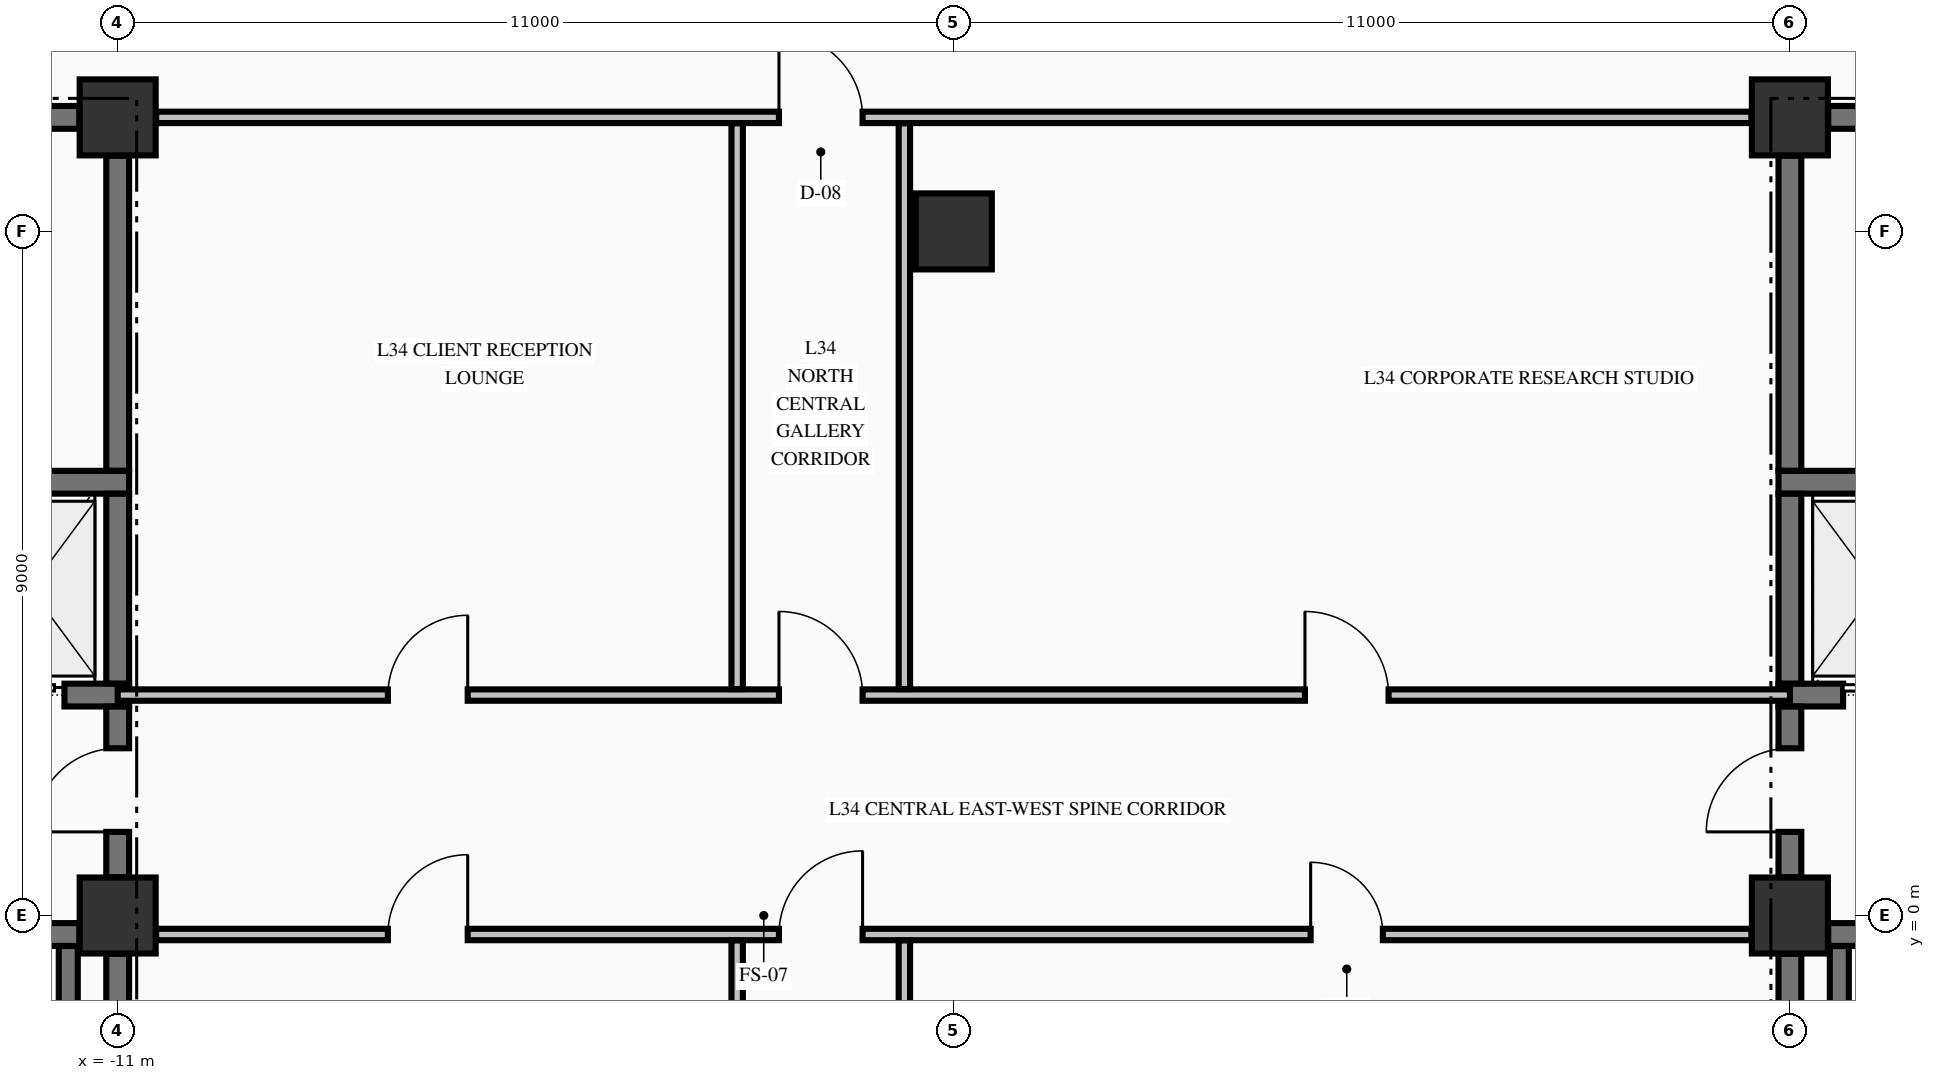
"""IFC4 building model, lengths in metres.
Left out: names, types, materials, properties, quantities, classifications, styles, units other than length and angle.
Written with IfcOpenShell. Run it as: python <this file> out.ifc"""

import sys

from ifc_helpers import new_model, si_unit, direction, frame, frame_2d, origin, origin_2d, place, context, subcontext, project, spatial, rectangle, extrude, element, fill, save


model = new_model("IFC4")
c1 = context("Model", 3, precision=1e-05, world=origin(), true_north=direction((0.0, 1.0)))
c2 = subcontext(c1, "Body", "Model", "MODEL_VIEW")
j1 = project(units=[si_unit("LENGTHUNIT", "METRE"), si_unit("PLANEANGLEUNIT", "RADIAN")], contexts=[c1])
p1 = place(None, origin())
s1 = spatial("IfcSite", under=j1, at=p1, CompositionType="ELEMENT")
p2 = place(p1, origin())
s2 = spatial("IfcBuilding", under=s1, at=p2, CompositionType="ELEMENT")
p3 = place(p2, frame((0.0, 0.0, 135.63)))
s3 = spatial("IfcBuildingStorey", under=s2, at=p3, CompositionType="ELEMENT", Elevation=135.63)
for number, where, z_axis, x_axis in (
    (1, (-11.0, 0.0, -0.25), (0.0, 0.0, 1.0), (1.0, 0.0, 0.0)),
    (2, (-11.0, 10.5, -0.25), (0.0, 0.0, 1.0), (1.0, 0.0, 0.0)),
    (3, (11.0, 0.0, -0.25), (0.0, 0.0, 1.0), (1.0, 0.0, 0.0)),
    (4, (11.0, 10.5, -0.25), (0.0, 0.0, 1.0), (1.0, 0.0, 0.0)),
    (5, (0.0, 9.0, -0.25), (0.0, 0.0, 1.0), (1.0, 0.0, 0.0)),
):
    element("IfcColumn", number, at=place(p3, frame(where, z_axis=z_axis, x_axis=x_axis)), inside=s3, PredefinedType="COLUMN", context=c2, shape_type="SweptSolid", body=[
        extrude(rectangle(XDim=1.0, YDim=1.0, at=origin_2d()), origin(), (0.0, 0.0, 1.0), 3.57),
    ])
p4 = place(p3, frame((-19.496, -0.25, 0.0), z_axis=(0.0, 0.0, 1.0), x_axis=(1.0, 0.0, 0.0)))
e6 = element("IfcWall", 6, at=p4, inside=s3, PredefinedType="SHEAR", context=c2, shape_type="SweptSolid", body=[
    extrude(rectangle(XDim=7.992, YDim=0.3, at=frame_2d((3.996, 0.0))), origin(), (0.0, 0.0, 1.0), 3.32),
])
p5 = place(p4, frame((5.796, 0.0, 0.0)))
e7 = element("IfcOpeningElement", 7, at=p5, cuts=e6, PredefinedType="OPENING", context=c2, shape_type="SweptSolid", body=[
    extrude(rectangle(XDim=1.1, YDim=2.15, at=frame_2d((0.55, 1.075))), frame((0.0, 0.16, 0.0), z_axis=(0.0, -1.0, 0.0), x_axis=(1.0, 0.0, 0.0)), (0.0, 0.0, 1.0), 0.32),
])
p6 = place(p3, frame((11.504, -0.25, 0.0), z_axis=(0.0, 0.0, 1.0), x_axis=(1.0, 0.0, 0.0)))
e8 = element("IfcWall", 8, at=p6, inside=s3, PredefinedType="SHEAR", context=c2, shape_type="SweptSolid", body=[
    extrude(rectangle(XDim=3.371, YDim=0.3, at=frame_2d((1.686, 0.0))), origin(), (0.0, 0.0, 1.0), 3.32),
])
p7 = place(p6, frame((1.096, 0.0, 0.0)))
e9 = element("IfcOpeningElement", 9, at=p7, cuts=e8, PredefinedType="OPENING", context=c2, shape_type="SweptSolid", body=[
    extrude(rectangle(XDim=1.1, YDim=2.15, at=frame_2d((0.55, 1.075))), frame((0.0, 0.16, 0.0), z_axis=(0.0, -1.0, 0.0), x_axis=(1.0, 0.0, 0.0)), (0.0, 0.0, 1.0), 0.32),
])
p8 = place(p3, frame((-14.875, 2.9, 0.0), z_axis=(0.0, 0.0, 1.0), x_axis=(1.0, 0.0, 0.0)))
e10 = element("IfcWall", 10, at=p8, inside=s3, PredefinedType="SHEAR", context=c2, shape_type="SweptSolid", body=[
    extrude(rectangle(XDim=4.025, YDim=0.3, at=frame_2d((2.012, 0.0))), origin(), (0.0, 0.0, 1.0), 3.32),
])
p9 = place(p8, frame((2.075, 0.0, 0.0)))
e11 = element("IfcOpeningElement", 11, at=p9, cuts=e10, PredefinedType="OPENING", context=c2, shape_type="SweptSolid", body=[
    extrude(rectangle(XDim=1.1, YDim=2.2, at=frame_2d((0.55, 1.1))), frame((0.0, 0.16, 0.0), z_axis=(0.0, -1.0, 0.0), x_axis=(1.0, 0.0, 0.0)), (0.0, 0.0, 1.0), 0.32),
])
p10 = place(p3, frame((10.85, 2.9, 0.0), z_axis=(0.0, 0.0, 1.0), x_axis=(1.0, 0.0, 0.0)))
e12 = element("IfcWall", 12, at=p10, inside=s3, PredefinedType="SHEAR", context=c2, shape_type="SweptSolid", body=[
    extrude(rectangle(XDim=4.025, YDim=0.3, at=frame_2d((2.012, 0.0))), origin(), (0.0, 0.0, 1.0), 3.32),
])
p11 = place(p10, frame((0.85, 0.0, 0.0)))
e13 = element("IfcOpeningElement", 13, at=p11, cuts=e12, PredefinedType="OPENING", context=c2, shape_type="SweptSolid", body=[
    extrude(rectangle(XDim=1.1, YDim=2.2, at=frame_2d((0.55, 1.1))), frame((0.0, 0.16, 0.0), z_axis=(0.0, -1.0, 0.0), x_axis=(1.0, 0.0, 0.0)), (0.0, 0.0, 1.0), 0.32),
])
for number, where, z_axis, x_axis in (
    (14, (-14.875, 5.7, 0.0), (0.0, 0.0, 1.0), (1.0, 0.0, 0.0)),
    (15, (10.85, 5.7, 0.0), (0.0, 0.0, 1.0), (1.0, 0.0, 0.0)),
):
    element("IfcWall", number, at=place(p3, frame(where, z_axis=z_axis, x_axis=x_axis)), inside=s3, PredefinedType="SHEAR", context=c2, shape_type="SweptSolid", body=[
        extrude(rectangle(XDim=4.025, YDim=0.3, at=frame_2d((2.012, 0.0))), origin(), (0.0, 0.0, 1.0), 3.32),
    ])
p12 = place(p3, frame((-14.7, 10.5, 0.0), z_axis=(0.0, 0.0, 1.0), x_axis=(1.0, 0.0, 0.0)))
e16 = element("IfcWall", 16, at=p12, inside=s3, PredefinedType="SHEAR", context=c2, shape_type="SweptSolid", body=[
    extrude(rectangle(XDim=3.196, YDim=0.3, at=frame_2d((1.598, 0.0))), origin(), (0.0, 0.0, 1.0), 3.32),
])
p13 = place(p12, frame((0.775, 0.0, 0.0)))
e17 = element("IfcOpeningElement", 17, at=p13, cuts=e16, PredefinedType="OPENING", context=c2, shape_type="SweptSolid", body=[
    extrude(rectangle(XDim=0.95, YDim=2.15, at=frame_2d((0.475, 1.075))), frame((0.0, 0.16, 0.0), z_axis=(0.0, -1.0, 0.0), x_axis=(1.0, 0.0, 0.0)), (0.0, 0.0, 1.0), 0.32),
])
p14 = place(p3, frame((11.504, 10.5, 0.0), z_axis=(0.0, 0.0, 1.0), x_axis=(1.0, 0.0, 0.0)))
e18 = element("IfcWall", 18, at=p14, inside=s3, PredefinedType="SHEAR", context=c2, shape_type="SweptSolid", body=[
    extrude(rectangle(XDim=3.196, YDim=0.3, at=frame_2d((1.598, 0.0))), origin(), (0.0, 0.0, 1.0), 3.32),
])
p15 = place(p14, frame((1.471, 0.0, 0.0)))
e19 = element("IfcOpeningElement", 19, at=p15, cuts=e18, PredefinedType="OPENING", context=c2, shape_type="SweptSolid", body=[
    extrude(rectangle(XDim=0.95, YDim=2.15, at=frame_2d((0.475, 1.075))), frame((0.0, 0.16, 0.0), z_axis=(0.0, -1.0, 0.0), x_axis=(1.0, 0.0, 0.0)), (0.0, 0.0, 1.0), 0.32),
])
p16 = place(p3, frame((-10.494, -0.25, 0.0), z_axis=(0.0, 0.0, 1.0), x_axis=(1.0, 0.0, 0.0)))
e20 = element("IfcWall", 20, at=p16, inside=s3, PredefinedType="PARTITIONING", context=c2, shape_type="SweptSolid", body=[
    extrude(rectangle(XDim=20.988, YDim=0.15, at=frame_2d((10.494, 0.0))), origin(), (0.0, 0.0, 1.0), 3.32),
])
p17 = place(p16, frame((8.194, 0.0, 0.0)))
e21 = element("IfcOpeningElement", 21, at=p17, cuts=e20, PredefinedType="OPENING", context=c2, shape_type="SweptSolid", body=[
    extrude(rectangle(XDim=1.1, YDim=2.15, at=frame_2d((0.55, 1.075))), frame((0.0, 0.085, 0.0), z_axis=(0.0, -1.0, 0.0), x_axis=(1.0, 0.0, 0.0)), (0.0, 0.0, 1.0), 0.17),
])
p18 = place(p16, frame((3.049, 0.0, 0.0)))
e22 = element("IfcOpeningElement", 22, at=p18, cuts=e20, PredefinedType="OPENING", context=c2, shape_type="SweptSolid", body=[
    extrude(rectangle(XDim=1.05, YDim=2.15, at=frame_2d((0.525, 1.075))), frame((0.0, 0.085, 0.0), z_axis=(0.0, -1.0, 0.0), x_axis=(1.0, 0.0, 0.0)), (0.0, 0.0, 1.0), 0.17),
])
p19 = place(p16, frame((15.189, 0.0, 0.0)))
e23 = element("IfcOpeningElement", 23, at=p19, cuts=e20, PredefinedType="OPENING", context=c2, shape_type="SweptSolid", body=[
    extrude(rectangle(XDim=0.95, YDim=2.15, at=frame_2d((0.475, 1.075))), frame((0.0, 0.085, 0.0), z_axis=(0.0, -1.0, 0.0), x_axis=(1.0, 0.0, 0.0)), (0.0, 0.0, 1.0), 0.17),
])
p20 = place(p3, frame((-11.0, 2.9, 0.0), z_axis=(0.0, 0.0, 1.0), x_axis=(1.0, 0.0, 0.0)))
e24 = element("IfcWall", 24, at=p20, inside=s3, PredefinedType="PARTITIONING", context=c2, shape_type="SweptSolid", body=[
    extrude(rectangle(XDim=22.0, YDim=0.15, at=frame_2d((11.0, 0.0))), origin(), (0.0, 0.0, 1.0), 3.32),
])
p21 = place(p20, frame((8.7, 0.0, 0.0)))
e25 = element("IfcOpeningElement", 25, at=p21, cuts=e24, PredefinedType="OPENING", context=c2, shape_type="SweptSolid", body=[
    extrude(rectangle(XDim=1.1, YDim=2.15, at=frame_2d((0.55, 1.075))), frame((0.0, 0.085, 0.0), z_axis=(0.0, -1.0, 0.0), x_axis=(1.0, 0.0, 0.0)), (0.0, 0.0, 1.0), 0.17),
])
p22 = place(p20, frame((3.555, 0.0, 0.0)))
e26 = element("IfcOpeningElement", 26, at=p22, cuts=e24, PredefinedType="OPENING", context=c2, shape_type="SweptSolid", body=[
    extrude(rectangle(XDim=1.05, YDim=2.15, at=frame_2d((0.525, 1.075))), frame((0.0, 0.085, 0.0), z_axis=(0.0, -1.0, 0.0), x_axis=(1.0, 0.0, 0.0)), (0.0, 0.0, 1.0), 0.17),
])
p23 = place(p20, frame((15.62, 0.0, 0.0)))
e27 = element("IfcOpeningElement", 27, at=p23, cuts=e24, PredefinedType="OPENING", context=c2, shape_type="SweptSolid", body=[
    extrude(rectangle(XDim=1.1, YDim=2.15, at=frame_2d((0.55, 1.075))), frame((0.0, 0.085, 0.0), z_axis=(0.0, -1.0, 0.0), x_axis=(1.0, 0.0, 0.0)), (0.0, 0.0, 1.0), 0.17),
])
p24 = place(p3, frame((-10.494, 10.5, 0.0), z_axis=(0.0, 0.0, 1.0), x_axis=(1.0, 0.0, 0.0)))
e28 = element("IfcWall", 28, at=p24, inside=s3, PredefinedType="PARTITIONING", context=c2, shape_type="SweptSolid", body=[
    extrude(rectangle(XDim=20.988, YDim=0.15, at=frame_2d((10.494, 0.0))), origin(), (0.0, 0.0, 1.0), 3.32),
])
p25 = place(p24, frame((8.194, 0.0, 0.0)))
e29 = element("IfcOpeningElement", 29, at=p25, cuts=e28, PredefinedType="OPENING", context=c2, shape_type="SweptSolid", body=[
    extrude(rectangle(XDim=1.1, YDim=2.15, at=frame_2d((0.55, 1.075))), frame((0.0, 0.085, 0.0), z_axis=(0.0, -1.0, 0.0), x_axis=(1.0, 0.0, 0.0)), (0.0, 0.0, 1.0), 0.17),
])
p26 = place(p3, frame((-11.65, -9.798, 0.0), z_axis=(0.0, 0.0, 1.0), x_axis=(0.0, 1.0, 0.0)))
e30 = element("IfcWall", 30, at=p26, inside=s3, PredefinedType="SOLIDWALL", context=c2, shape_type="SweptSolid", body=[
    extrude(rectangle(XDim=9.396, YDim=0.25, at=frame_2d((4.698, 0.0))), origin(), (0.0, 0.0, 1.0), 3.32),
])
p27 = place(p3, frame((-11.0, -9.446, 0.0), z_axis=(0.0, 0.0, 1.0), x_axis=(0.0, 1.0, 0.0)))
e31 = element("IfcWall", 31, at=p27, inside=s3, PredefinedType="SHEAR", context=c2, shape_type="SweptSolid", body=[
    extrude(rectangle(XDim=8.942, YDim=0.3, at=frame_2d((4.471, 0.0))), origin(), (0.0, 0.0, 1.0), 3.32),
])
p28 = place(p3, frame((-11.0, 0.504, 0.0), z_axis=(0.0, 0.0, 1.0), x_axis=(0.0, 1.0, 0.0)))
e32 = element("IfcWall", 32, at=p28, inside=s3, PredefinedType="SHEAR", context=c2, shape_type="SweptSolid", body=[
    extrude(rectangle(XDim=2.244, YDim=0.3, at=frame_2d((1.122, 0.0))), origin(), (0.0, 0.0, 1.0), 3.32),
])
p29 = place(p28, frame((0.596, 0.0, 0.0)))
e33 = element("IfcOpeningElement", 33, at=p29, cuts=e32, PredefinedType="OPENING", context=c2, shape_type="SweptSolid", body=[
    extrude(rectangle(XDim=1.1, YDim=2.15, at=frame_2d((0.55, 1.075))), frame((0.0, 0.16, 0.0), z_axis=(0.0, -1.0, 0.0), x_axis=(1.0, 0.0, 0.0)), (0.0, 0.0, 1.0), 0.32),
])
p30 = place(p3, frame((-11.0, 3.052, 0.0), z_axis=(0.0, 0.0, 1.0), x_axis=(0.0, 1.0, 0.0)))
e34 = element("IfcWall", 34, at=p30, inside=s3, PredefinedType="SHEAR", context=c2, shape_type="SweptSolid", body=[
    extrude(rectangle(XDim=2.496, YDim=0.3, at=frame_2d((1.248, 0.0))), origin(), (0.0, 0.0, 1.0), 3.32),
])
p31 = place(p3, frame((-11.0, 5.852, 0.0), z_axis=(0.0, 0.0, 1.0), x_axis=(0.0, 1.0, 0.0)))
e35 = element("IfcWall", 35, at=p31, inside=s3, PredefinedType="SHEAR", context=c2, shape_type="SweptSolid", body=[
    extrude(rectangle(XDim=4.144, YDim=0.3, at=frame_2d((2.072, 0.0))), origin(), (0.0, 0.0, 1.0), 3.32),
])
p32 = place(p3, frame((11.0, -9.446, 0.0), z_axis=(0.0, 0.0, 1.0), x_axis=(0.0, 1.0, 0.0)))
e36 = element("IfcWall", 36, at=p32, inside=s3, PredefinedType="SHEAR", context=c2, shape_type="SweptSolid", body=[
    extrude(rectangle(XDim=8.942, YDim=0.3, at=frame_2d((4.471, 0.0))), origin(), (0.0, 0.0, 1.0), 3.32),
])
p33 = place(p3, frame((11.0, 0.504, 0.0), z_axis=(0.0, 0.0, 1.0), x_axis=(0.0, 1.0, 0.0)))
e37 = element("IfcWall", 37, at=p33, inside=s3, PredefinedType="SHEAR", context=c2, shape_type="SweptSolid", body=[
    extrude(rectangle(XDim=2.244, YDim=0.3, at=frame_2d((1.122, 0.0))), origin(), (0.0, 0.0, 1.0), 3.32),
])
p34 = place(p33, frame((0.596, 0.0, 0.0)))
e38 = element("IfcOpeningElement", 38, at=p34, cuts=e37, PredefinedType="OPENING", context=c2, shape_type="SweptSolid", body=[
    extrude(rectangle(XDim=1.1, YDim=2.15, at=frame_2d((0.55, 1.075))), frame((0.0, 0.16, 0.0), z_axis=(0.0, -1.0, 0.0), x_axis=(1.0, 0.0, 0.0)), (0.0, 0.0, 1.0), 0.32),
])
p35 = place(p3, frame((11.0, 3.052, 0.0), z_axis=(0.0, 0.0, 1.0), x_axis=(0.0, 1.0, 0.0)))
e39 = element("IfcWall", 39, at=p35, inside=s3, PredefinedType="SHEAR", context=c2, shape_type="SweptSolid", body=[
    extrude(rectangle(XDim=2.496, YDim=0.3, at=frame_2d((1.248, 0.0))), origin(), (0.0, 0.0, 1.0), 3.32),
])
p36 = place(p3, frame((11.0, 5.852, 0.0), z_axis=(0.0, 0.0, 1.0), x_axis=(0.0, 1.0, 0.0)))
e40 = element("IfcWall", 40, at=p36, inside=s3, PredefinedType="SHEAR", context=c2, shape_type="SweptSolid", body=[
    extrude(rectangle(XDim=4.144, YDim=0.3, at=frame_2d((2.072, 0.0))), origin(), (0.0, 0.0, 1.0), 3.32),
])
p37 = place(p3, frame((11.65, -9.798, 0.0), z_axis=(0.0, 0.0, 1.0), x_axis=(0.0, 1.0, 0.0)))
e41 = element("IfcWall", 41, at=p37, inside=s3, PredefinedType="SOLIDWALL", context=c2, shape_type="SweptSolid", body=[
    extrude(rectangle(XDim=9.396, YDim=0.25, at=frame_2d((4.698, 0.0))), origin(), (0.0, 0.0, 1.0), 3.32),
])
p38 = place(p3, frame((-2.85, -9.872, 0.0), z_axis=(0.0, 0.0, 1.0), x_axis=(0.0, 1.0, 0.0)))
e42 = element("IfcWall", 42, at=p38, inside=s3, PredefinedType="PARTITIONING", context=c2, shape_type="SweptSolid", body=[
    extrude(rectangle(XDim=9.544, YDim=0.15, at=frame_2d((4.772, 0.0))), origin(), (0.0, 0.0, 1.0), 3.32),
])
p39 = place(p3, frame((-2.85, 2.978, 0.0), z_axis=(0.0, 0.0, 1.0), x_axis=(0.0, 1.0, 0.0)))
e43 = element("IfcWall", 43, at=p39, inside=s3, PredefinedType="PARTITIONING", context=c2, shape_type="SweptSolid", body=[
    extrude(rectangle(XDim=7.444, YDim=0.15, at=frame_2d((3.722, 0.0))), origin(), (0.0, 0.0, 1.0), 3.32),
])
p40 = place(p3, frame((-0.65, -5.247, 0.0), z_axis=(0.0, 0.0, 1.0), x_axis=(0.0, 1.0, 0.0)))
e44 = element("IfcWall", 44, at=p40, inside=s3, PredefinedType="PARTITIONING", context=c2, shape_type="SweptSolid", body=[
    extrude(rectangle(XDim=4.919, YDim=0.15, at=frame_2d((2.459, 0.0))), origin(), (0.0, 0.0, 1.0), 3.32),
])
p41 = place(p3, frame((-0.65, 2.978, 0.0), z_axis=(0.0, 0.0, 1.0), x_axis=(0.0, 1.0, 0.0)))
e45 = element("IfcWall", 45, at=p41, inside=s3, PredefinedType="PARTITIONING", context=c2, shape_type="SweptSolid", body=[
    extrude(rectangle(XDim=7.444, YDim=0.15, at=frame_2d((3.722, 0.0))), origin(), (0.0, 0.0, 1.0), 3.32),
])
p42 = place(p29, origin())
e46 = element("IfcDoor", 46, at=p42, inside=s3, OperationType="SINGLE_SWING_LEFT", PredefinedType="DOOR", context=c2, shape_type="SweptSolid", body=[
    extrude(rectangle(XDim=1.1, YDim=2.15, at=frame_2d((0.55, 1.075))), frame((0.0, 0.025, 0.0), z_axis=(0.0, -1.0, 0.0), x_axis=(1.0, 0.0, 0.0)), (0.0, 0.0, 1.0), 0.05),
])
fill(e33, e46)
p43 = place(p9, origin())
e47 = element("IfcDoor", 47, at=p43, inside=s3, OperationType="SLIDING_TO_LEFT", PredefinedType="DOOR", context=c2, shape_type="SweptSolid", body=[
    extrude(rectangle(XDim=1.1, YDim=2.2, at=frame_2d((0.55, 1.1))), frame((0.0, 0.025, 0.0), z_axis=(0.0, -1.0, 0.0), x_axis=(1.0, 0.0, 0.0)), (0.0, 0.0, 1.0), 0.05),
])
fill(e11, e47)
p44 = place(p34, origin())
e48 = element("IfcDoor", 48, at=p44, inside=s3, OperationType="SINGLE_SWING_LEFT", PredefinedType="DOOR", context=c2, shape_type="SweptSolid", body=[
    extrude(rectangle(XDim=1.1, YDim=2.15, at=frame_2d((0.55, 1.075))), frame((0.0, 0.025, 0.0), z_axis=(0.0, -1.0, 0.0), x_axis=(1.0, 0.0, 0.0)), (0.0, 0.0, 1.0), 0.05),
])
fill(e38, e48)
p45 = place(p11, origin())
e49 = element("IfcDoor", 49, at=p45, inside=s3, OperationType="SLIDING_TO_RIGHT", PredefinedType="DOOR", context=c2, shape_type="SweptSolid", body=[
    extrude(rectangle(XDim=1.1, YDim=2.2, at=frame_2d((0.55, 1.1))), frame((0.0, 0.025, 0.0), z_axis=(0.0, -1.0, 0.0), x_axis=(1.0, 0.0, 0.0)), (0.0, 0.0, 1.0), 0.05),
])
fill(e13, e49)
p46 = place(p25, origin())
e50 = element("IfcDoor", 50, at=p46, inside=s3, OperationType="SINGLE_SWING_LEFT", PredefinedType="DOOR", context=c2, shape_type="SweptSolid", body=[
    extrude(rectangle(XDim=1.1, YDim=2.15, at=frame_2d((0.55, 1.075))), frame((0.0, 0.025, 0.0), z_axis=(0.0, -1.0, 0.0), x_axis=(1.0, 0.0, 0.0)), (0.0, 0.0, 1.0), 0.05),
])
fill(e29, e50)
p47 = place(p21, origin())
e51 = element("IfcDoor", 51, at=p47, inside=s3, OperationType="SINGLE_SWING_LEFT", PredefinedType="DOOR", context=c2, shape_type="SweptSolid", body=[
    extrude(rectangle(XDim=1.1, YDim=2.15, at=frame_2d((0.55, 1.075))), frame((0.0, 0.025, 0.0), z_axis=(0.0, -1.0, 0.0), x_axis=(1.0, 0.0, 0.0)), (0.0, 0.0, 1.0), 0.05),
])
fill(e25, e51)
p48 = place(p17, origin())
e52 = element("IfcDoor", 52, at=p48, inside=s3, OperationType="SINGLE_SWING_RIGHT", PredefinedType="DOOR", context=c2, shape_type="SweptSolid", body=[
    extrude(rectangle(XDim=1.1, YDim=2.15, at=frame_2d((0.55, 1.075))), frame((0.0, 0.025, 0.0), z_axis=(0.0, -1.0, 0.0), x_axis=(1.0, 0.0, 0.0)), (0.0, 0.0, 1.0), 0.05),
])
fill(e21, e52)
p49 = place(p22, origin())
e53 = element("IfcDoor", 53, at=p49, inside=s3, OperationType="SINGLE_SWING_RIGHT", PredefinedType="DOOR", context=c2, shape_type="SweptSolid", body=[
    extrude(rectangle(XDim=1.05, YDim=2.15, at=frame_2d((0.525, 1.075))), frame((0.0, 0.025, 0.0), z_axis=(0.0, -1.0, 0.0), x_axis=(1.0, 0.0, 0.0)), (0.0, 0.0, 1.0), 0.05),
])
fill(e26, e53)
p50 = place(p23, origin())
e54 = element("IfcDoor", 54, at=p50, inside=s3, OperationType="SINGLE_SWING_LEFT", PredefinedType="DOOR", context=c2, shape_type="SweptSolid", body=[
    extrude(rectangle(XDim=1.1, YDim=2.15, at=frame_2d((0.55, 1.075))), frame((0.0, 0.025, 0.0), z_axis=(0.0, -1.0, 0.0), x_axis=(1.0, 0.0, 0.0)), (0.0, 0.0, 1.0), 0.05),
])
fill(e27, e54)
p51 = place(p18, origin())
e55 = element("IfcDoor", 55, at=p51, inside=s3, OperationType="SINGLE_SWING_RIGHT", PredefinedType="DOOR", context=c2, shape_type="SweptSolid", body=[
    extrude(rectangle(XDim=1.05, YDim=2.15, at=frame_2d((0.525, 1.075))), frame((0.0, 0.025, 0.0), z_axis=(0.0, -1.0, 0.0), x_axis=(1.0, 0.0, 0.0)), (0.0, 0.0, 1.0), 0.05),
])
fill(e22, e55)
p52 = place(p19, origin())
e56 = element("IfcDoor", 56, at=p52, inside=s3, OperationType="SINGLE_SWING_LEFT", PredefinedType="DOOR", context=c2, shape_type="SweptSolid", body=[
    extrude(rectangle(XDim=0.95, YDim=2.15, at=frame_2d((0.475, 1.075))), frame((0.0, 0.025, 0.0), z_axis=(0.0, -1.0, 0.0), x_axis=(1.0, 0.0, 0.0)), (0.0, 0.0, 1.0), 0.05),
])
fill(e23, e56)
save(model, sys.argv[1])
